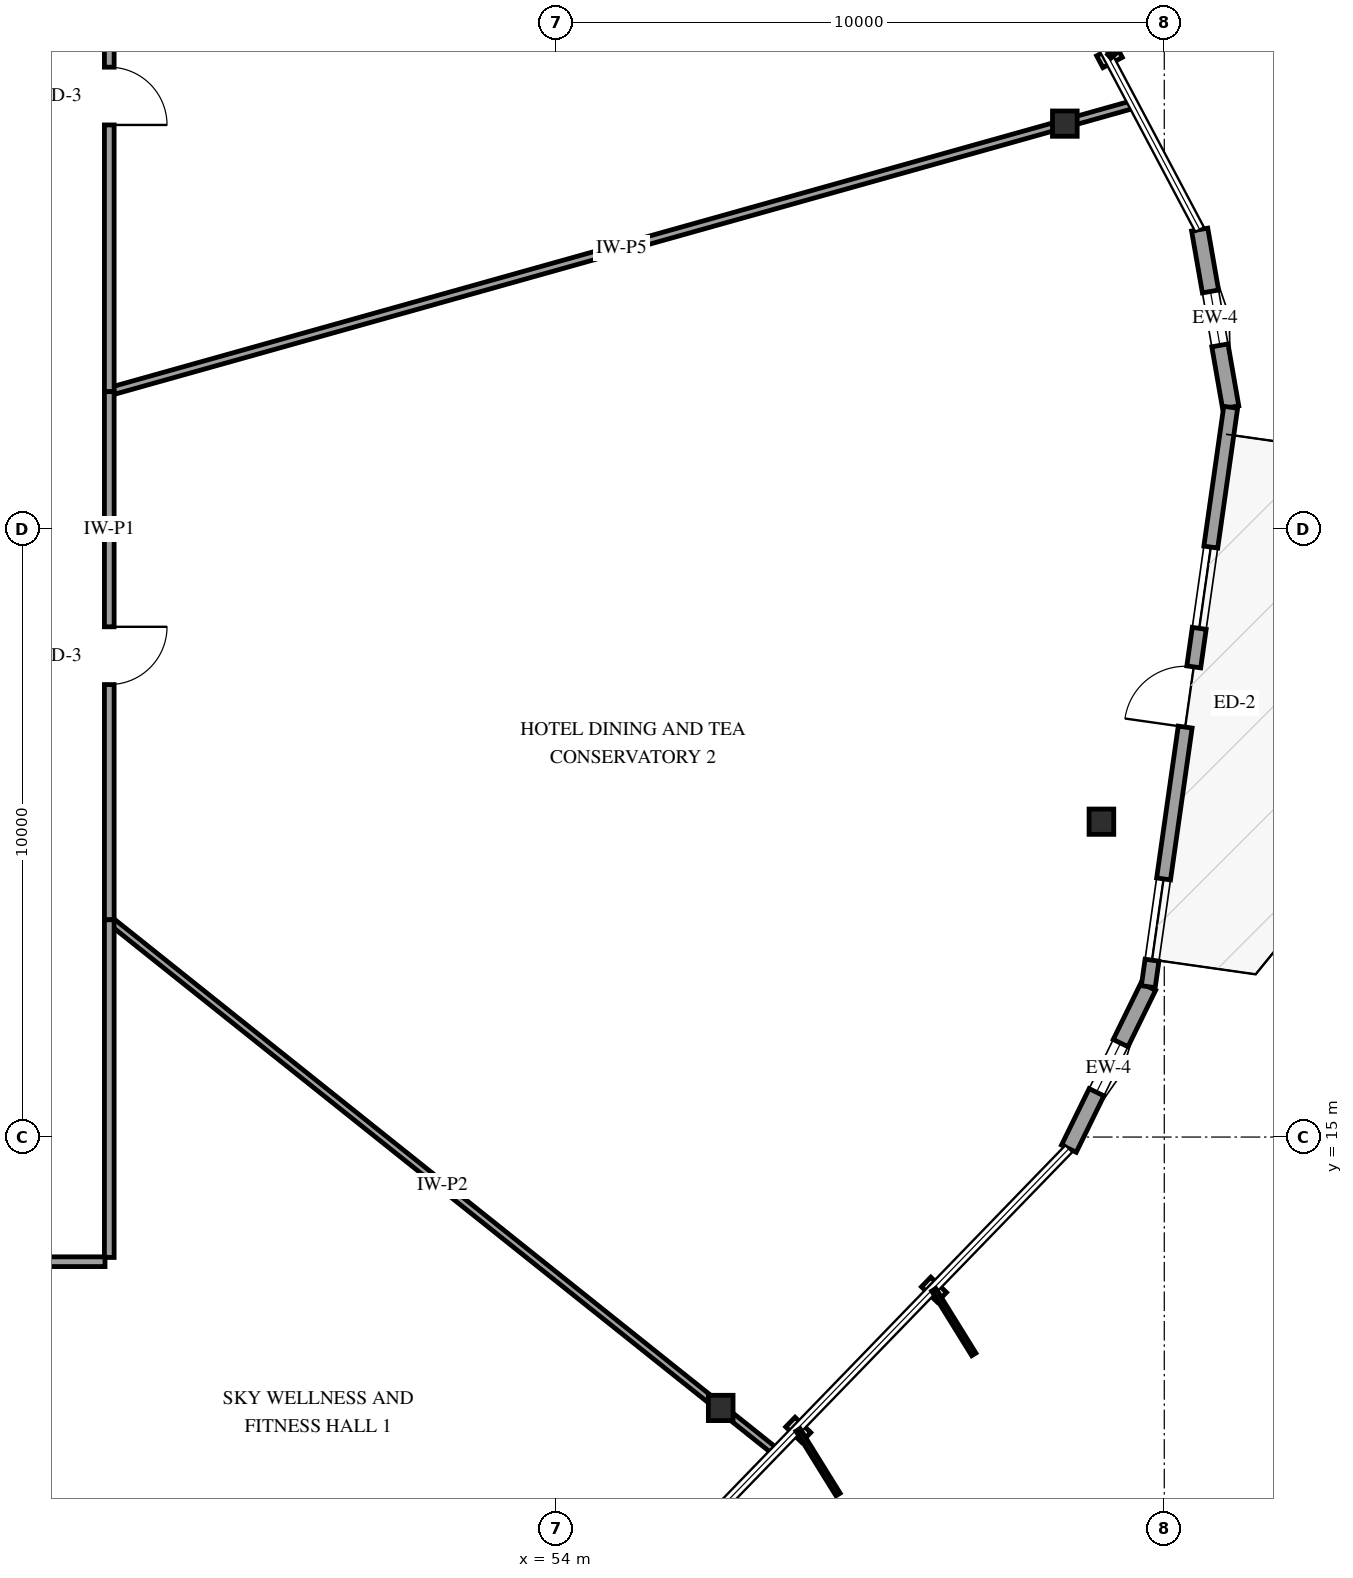
"""IFC4 building model, lengths in metres.
Left out: names, types, materials, properties, quantities, classifications, styles, units other than length and angle.
Written with IfcOpenShell. Run it as: python <this file> out.ifc"""

import sys

from ifc_helpers import new_model, si_unit, direction, frame, frame_2d, origin, origin_2d, place, context, subcontext, project, spatial, rectangle, i_section, extrude, element, fill, save


model = new_model("IFC4")
c1 = context("Model", 3, precision=1e-05, world=origin(), true_north=direction((0.0, 1.0)))
c2 = subcontext(c1, "Body", "Model", "MODEL_VIEW")
j1 = project(units=[si_unit("LENGTHUNIT", "METRE"), si_unit("PLANEANGLEUNIT", "RADIAN")], contexts=[c1])
p1 = place(None, origin())
s1 = spatial("IfcSite", under=j1, at=p1, CompositionType="ELEMENT")
p2 = place(p1, origin())
s2 = spatial("IfcBuilding", under=s1, at=p2, CompositionType="ELEMENT")
p3 = place(p2, frame((0.0, 0.0, 201.4)))
s3 = spatial("IfcBuildingStorey", under=s2, at=p3, CompositionType="ELEMENT", Elevation=201.4)
for number, where, z_axis, x_axis in (
    (1, (62.365, 31.666, 0.0), (0.0, 0.0, 1.0), (1.0, 0.0, 0.0)),
    (2, (56.705, 10.545, 0.0), (0.0, 0.0, 1.0), (1.0, 0.0, 0.0)),
    (3, (62.966, 20.186, 0.0), (0.0, 0.0, 1.0), (1.0, 0.0, 0.0)),
):
    element("IfcColumn", number, at=place(p3, frame(where, z_axis=z_axis, x_axis=x_axis)), inside=s3, PredefinedType="COLUMN", context=c2, shape_type="SweptSolid", body=[
        extrude(i_section(OverallWidth=0.406, OverallDepth=0.416, WebThickness=0.03, FlangeThickness=0.048, FilletRadius=0.038, at=origin_2d()), origin(), (0.0, 0.0, 1.0), 3.6),
    ])
p4 = place(p3, frame((62.431, 14.809, 0.0), z_axis=(0.0, 0.0, 1.0), x_axis=(0.439956847616, 0.898018915299, 0.0)))
e4 = element("IfcWall", 4, at=p4, inside=s3, PredefinedType="SOLIDWALL", context=c2, shape_type="SweptSolid", body=[
    extrude(rectangle(XDim=2.967, YDim=0.27, at=frame_2d((1.483, 0.0))), origin(), (0.0, 0.0, 1.0), 2.679),
])
p5 = place(p4, frame((1.033, 0.0, 0.75)))
e5 = element("IfcOpeningElement", 5, at=p5, cuts=e4, PredefinedType="OPENING", context=c2, shape_type="SweptSolid", body=[
    extrude(rectangle(XDim=0.9, YDim=1.5, at=frame_2d((0.45, 0.75))), frame((0.0, 0.145, 0.0), z_axis=(0.0, -1.0, 0.0), x_axis=(1.0, 0.0, 0.0)), (0.0, 0.0, 1.0), 0.29),
])
p6 = place(p3, frame((65.092, 27.001, 0.0), z_axis=(0.0, 0.0, 1.0), x_axis=(-0.171921159352, 0.985110712036, 0.0)))
e6 = element("IfcWall", 6, at=p6, inside=s3, PredefinedType="SOLIDWALL", context=c2, shape_type="SweptSolid", body=[
    extrude(rectangle(XDim=2.967, YDim=0.27, at=frame_2d((1.483, 0.0))), origin(), (0.0, 0.0, 1.0), 2.679),
])
p7 = place(p6, frame((1.033, 0.0, 0.75)))
e7 = element("IfcOpeningElement", 7, at=p7, cuts=e6, PredefinedType="OPENING", context=c2, shape_type="SweptSolid", body=[
    extrude(rectangle(XDim=0.9, YDim=1.5, at=frame_2d((0.45, 0.75))), frame((0.0, 0.145, 0.0), z_axis=(0.0, -1.0, 0.0), x_axis=(1.0, 0.0, 0.0)), (0.0, 0.0, 1.0), 0.29),
])
p8 = place(p3, frame((63.736, 17.473, 0.0), z_axis=(0.0, 0.0, 1.0), x_axis=(0.14089216596, 0.990024947954, 0.0)))
e8 = element("IfcWall", 8, at=p8, inside=s3, PredefinedType="SOLIDWALL", context=c2, shape_type="SweptSolid", body=[
    extrude(rectangle(XDim=9.624, YDim=0.23, at=frame_2d((4.812, 0.0))), origin(), (0.0, 0.0, 1.0), 2.679),
])
p9 = place(p8, frame((4.312, 0.0, 0.0)))
e9 = element("IfcOpeningElement", 9, at=p9, cuts=e8, PredefinedType="OPENING", context=c2, shape_type="SweptSolid", body=[
    extrude(rectangle(XDim=1.0, YDim=2.15, at=frame_2d((0.5, 1.075))), frame((0.0, 0.125, 0.0), z_axis=(0.0, -1.0, 0.0), x_axis=(1.0, 0.0, 0.0)), (0.0, 0.0, 1.0), 0.25),
])
p10 = place(p8, frame((0.44, 0.0, 0.72)))
e10 = element("IfcOpeningElement", 10, at=p10, cuts=e8, PredefinedType="OPENING", context=c2, shape_type="SweptSolid", body=[
    extrude(rectangle(XDim=1.35, YDim=1.65, at=frame_2d((0.675, 0.825))), frame((0.0, 0.125, 0.0), z_axis=(0.0, -1.0, 0.0), x_axis=(1.0, 0.0, 0.0)), (0.0, 0.0, 1.0), 0.25),
])
p11 = place(p8, frame((5.952, 0.0, 0.72)))
e11 = element("IfcOpeningElement", 11, at=p11, cuts=e8, PredefinedType="OPENING", context=c2, shape_type="SweptSolid", body=[
    extrude(rectangle(XDim=1.35, YDim=1.65, at=frame_2d((0.675, 0.825))), frame((0.0, 0.125, 0.0), z_axis=(0.0, -1.0, 0.0), x_axis=(1.0, 0.0, 0.0)), (0.0, 0.0, 1.0), 0.25),
])
p12 = place(p3, frame((63.492, 31.982, 0.0), z_axis=(0.0, 0.0, 1.0), x_axis=(-0.962843609525, -0.270059592675, 0.0)))
e12 = element("IfcWall", 12, at=p12, inside=s3, PredefinedType="PARTITIONING", context=c2, shape_type="SweptSolid", body=[
    extrude(rectangle(XDim=17.492, YDim=0.13, at=frame_2d((8.746, 0.0))), origin(), (0.0, 0.0, 1.0), 3.3),
])
p13 = place(p3, frame((46.65, 18.573, 0.0), z_axis=(0.0, 0.0, 1.0), x_axis=(0.781500547288, -0.623904555672, 0.0)))
e13 = element("IfcWall", 13, at=p13, inside=s3, PredefinedType="PARTITIONING", context=c2, shape_type="SweptSolid", body=[
    extrude(rectangle(XDim=14.017, YDim=0.12, at=frame_2d((7.008, 0.0))), origin(), (0.0, 0.0, 1.0), 3.3),
])
p14 = place(p3, frame((46.65, 36.98, 0.0), z_axis=(0.0, 0.0, 1.0), x_axis=(0.0, -1.0, 0.0)))
e14 = element("IfcWall", 14, at=p14, inside=s3, PredefinedType="PARTITIONING", context=c2, shape_type="SweptSolid", body=[
    extrude(rectangle(XDim=9.722, YDim=0.16, at=frame_2d((4.861, 0.0))), origin(), (0.0, 0.0, 1.0), 3.3),
])
p15 = place(p14, frame((4.386, 0.0, 0.0)))
e15 = element("IfcOpeningElement", 15, at=p15, cuts=e14, PredefinedType="OPENING", context=c2, shape_type="SweptSolid", body=[
    extrude(rectangle(XDim=0.95, YDim=2.15, at=frame_2d((0.475, 1.075))), frame((0.0, 0.09, 0.0), z_axis=(0.0, -1.0, 0.0), x_axis=(1.0, 0.0, 0.0)), (0.0, 0.0, 1.0), 0.18),
])
p16 = place(p3, frame((46.65, 27.258, 0.0), z_axis=(0.0, 0.0, 1.0), x_axis=(0.0, -1.0, 0.0)))
e16 = element("IfcWall", 16, at=p16, inside=s3, PredefinedType="PARTITIONING", context=c2, shape_type="SweptSolid", body=[
    extrude(rectangle(XDim=8.685, YDim=0.16, at=frame_2d((4.343, 0.0))), origin(), (0.0, 0.0, 1.0), 3.3),
])
p17 = place(p16, frame((3.867, 0.0, 0.0)))
e17 = element("IfcOpeningElement", 17, at=p17, cuts=e16, PredefinedType="OPENING", context=c2, shape_type="SweptSolid", body=[
    extrude(rectangle(XDim=0.95, YDim=2.15, at=frame_2d((0.475, 1.075))), frame((0.0, 0.09, 0.0), z_axis=(0.0, -1.0, 0.0), x_axis=(1.0, 0.0, 0.0)), (0.0, 0.0, 1.0), 0.18),
])
p18 = place(p3, frame((46.65, 18.573, 0.0), z_axis=(0.0, 0.0, 1.0), x_axis=(0.0, -1.0, 0.0)))
e18 = element("IfcWall", 18, at=p18, inside=s3, PredefinedType="PARTITIONING", context=c2, shape_type="SweptSolid", body=[
    extrude(rectangle(XDim=5.553, YDim=0.16, at=frame_2d((2.776, 0.0))), origin(), (0.0, 0.0, 1.0), 3.3),
])
p19 = place(p3, frame((46.58, 12.95, 0.0), z_axis=(0.0, 0.0, 1.0), x_axis=(-1.0, 0.0, 0.0)))
e19 = element("IfcWall", 19, at=p19, inside=s3, PredefinedType="PARTITIONING", context=c2, shape_type="SweptSolid", body=[
    extrude(rectangle(XDim=3.31, YDim=0.16, at=frame_2d((1.655, 0.0))), origin(), (0.0, 0.0, 1.0), 3.3),
])
p20 = place(p5, origin())
e20 = element("IfcWindow", 20, at=p20, inside=s3, PartitioningType="SINGLE_PANEL", PredefinedType="WINDOW", context=c2, shape_type="SweptSolid", body=[
    extrude(rectangle(XDim=0.9, YDim=1.5, at=frame_2d((0.45, 0.75))), frame((0.0, 0.03, 0.0), z_axis=(0.0, -1.0, 0.0), x_axis=(1.0, 0.0, 0.0)), (0.0, 0.0, 1.0), 0.06),
])
fill(e5, e20)
p21 = place(p7, origin())
e21 = element("IfcWindow", 21, at=p21, inside=s3, PartitioningType="SINGLE_PANEL", PredefinedType="WINDOW", context=c2, shape_type="SweptSolid", body=[
    extrude(rectangle(XDim=0.9, YDim=1.5, at=frame_2d((0.45, 0.75))), frame((0.0, 0.03, 0.0), z_axis=(0.0, -1.0, 0.0), x_axis=(1.0, 0.0, 0.0)), (0.0, 0.0, 1.0), 0.06),
])
fill(e7, e21)
p22 = place(p9, origin())
e22 = element("IfcDoor", 22, at=p22, inside=s3, OperationType="SINGLE_SWING_LEFT", PredefinedType="DOOR", context=c2, shape_type="SweptSolid", body=[
    extrude(rectangle(XDim=1.0, YDim=2.15, at=frame_2d((0.5, 1.075))), frame((0.0, 0.025, 0.0), z_axis=(0.0, -1.0, 0.0), x_axis=(1.0, 0.0, 0.0)), (0.0, 0.0, 1.0), 0.05),
])
fill(e9, e22)
p23 = place(p10, origin())
e23 = element("IfcWindow", 23, at=p23, inside=s3, PartitioningType="SINGLE_PANEL", PredefinedType="WINDOW", context=c2, shape_type="SweptSolid", body=[
    extrude(rectangle(XDim=1.35, YDim=1.65, at=frame_2d((0.675, 0.825))), frame((0.0, 0.03, 0.0), z_axis=(0.0, -1.0, 0.0), x_axis=(1.0, 0.0, 0.0)), (0.0, 0.0, 1.0), 0.06),
])
fill(e10, e23)
p24 = place(p11, origin())
e24 = element("IfcWindow", 24, at=p24, inside=s3, PartitioningType="SINGLE_PANEL", PredefinedType="WINDOW", context=c2, shape_type="SweptSolid", body=[
    extrude(rectangle(XDim=1.35, YDim=1.65, at=frame_2d((0.675, 0.825))), frame((0.0, 0.03, 0.0), z_axis=(0.0, -1.0, 0.0), x_axis=(1.0, 0.0, 0.0)), (0.0, 0.0, 1.0), 0.06),
])
fill(e11, e24)
p25 = place(p15, origin())
e25 = element("IfcDoor", 25, at=p25, inside=s3, OperationType="SINGLE_SWING_RIGHT", PredefinedType="DOOR", context=c2, shape_type="SweptSolid", body=[
    extrude(rectangle(XDim=0.95, YDim=2.15, at=frame_2d((0.475, 1.075))), frame((0.0, 0.025, 0.0), z_axis=(0.0, -1.0, 0.0), x_axis=(1.0, 0.0, 0.0)), (0.0, 0.0, 1.0), 0.05),
])
fill(e15, e25)
p26 = place(p17, origin())
e26 = element("IfcDoor", 26, at=p26, inside=s3, OperationType="SINGLE_SWING_LEFT", PredefinedType="DOOR", context=c2, shape_type="SweptSolid", body=[
    extrude(rectangle(XDim=0.95, YDim=2.15, at=frame_2d((0.475, 1.075))), frame((0.0, 0.025, 0.0), z_axis=(0.0, -1.0, 0.0), x_axis=(1.0, 0.0, 0.0)), (0.0, 0.0, 1.0), 0.05),
])
fill(e17, e26)
save(model, sys.argv[1])
